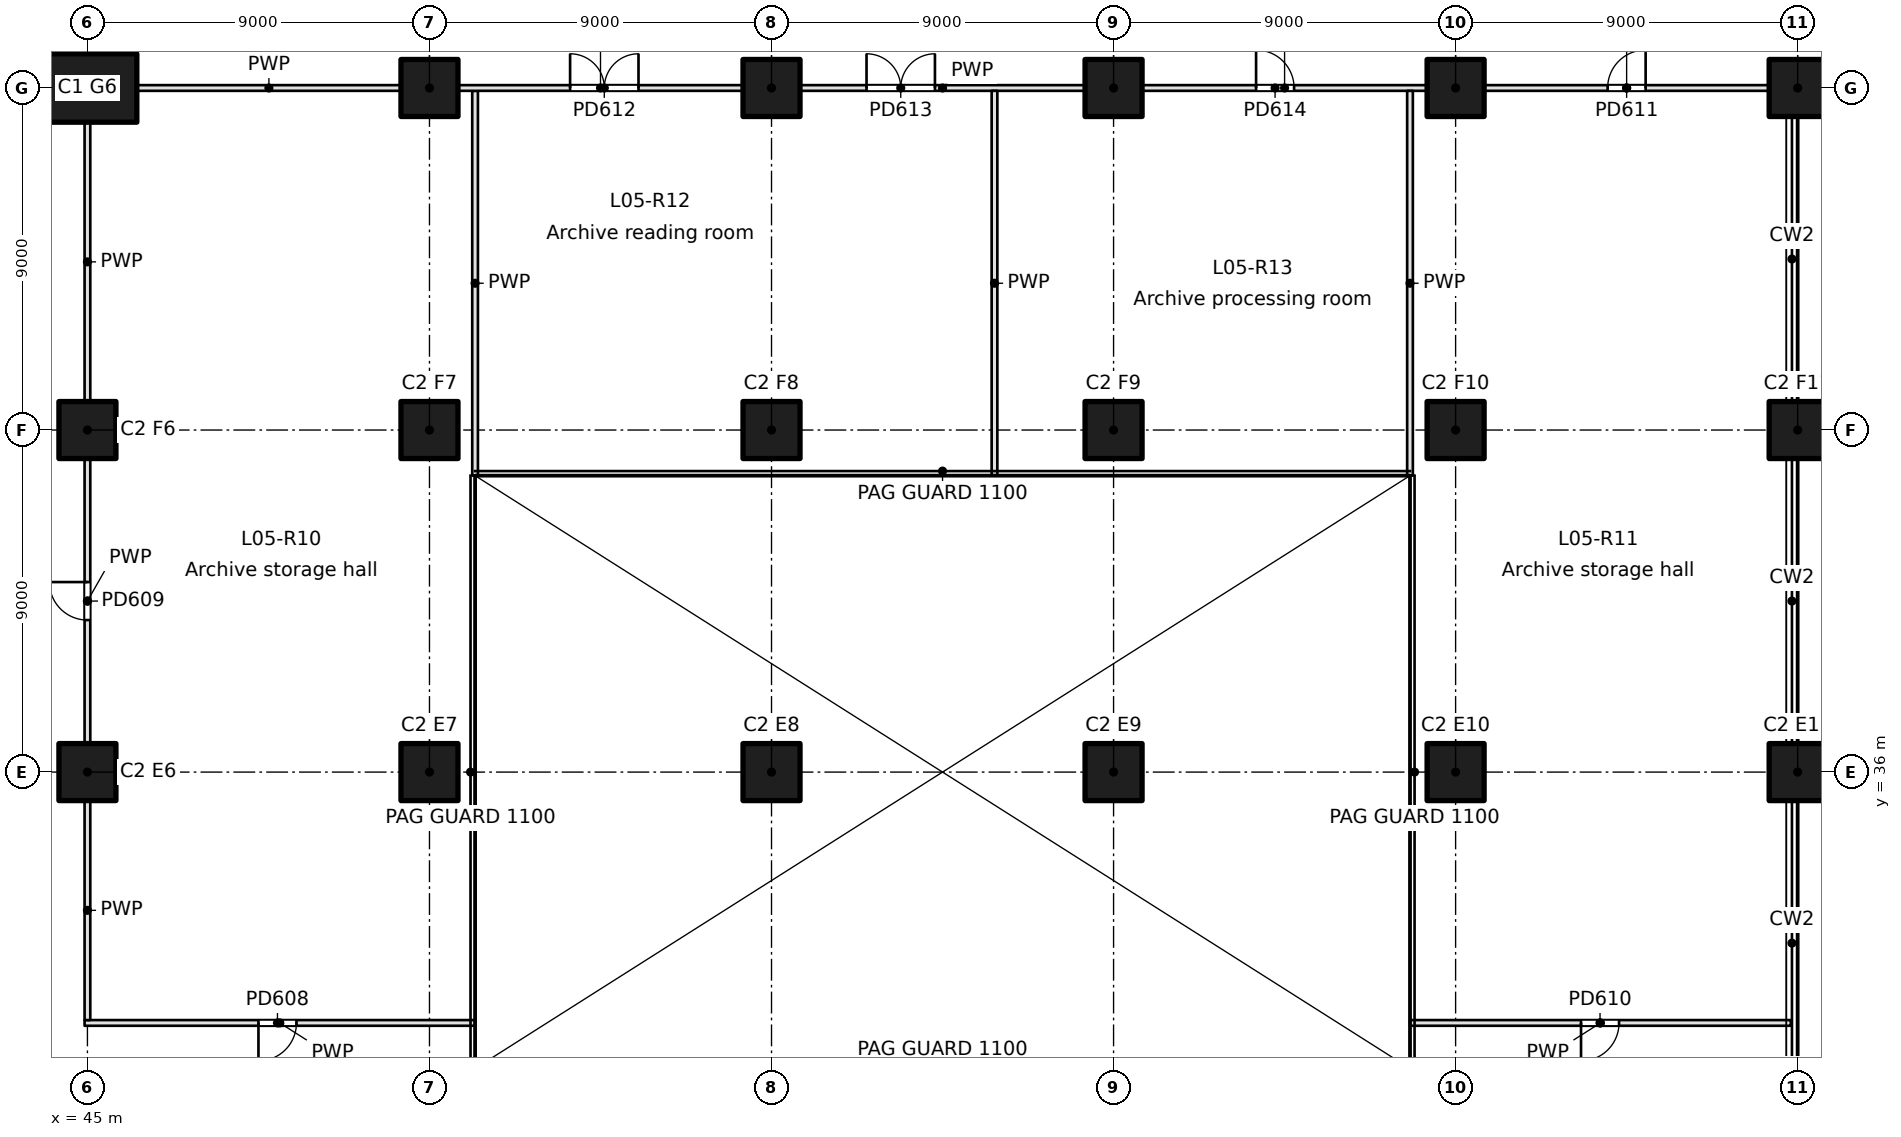
"""IFC4 building model, lengths in metres.
Left out: names, types, materials, properties, quantities, classifications, styles, units other than length and angle.
Written with IfcOpenShell. Run it as: python <this file> out.ifc"""

import sys

from ifc_helpers import new_model, si_unit, direction, frame, frame_2d, origin, origin_2d, place, context, subcontext, project, spatial, rectangle, extrude, element, fill, save


model = new_model("IFC4")
c1 = context("Model", 3, precision=1e-05, world=origin(), true_north=direction((0.0, 1.0)))
c2 = subcontext(c1, "Body", "Model", "MODEL_VIEW")
j1 = project(units=[si_unit("LENGTHUNIT", "METRE"), si_unit("PLANEANGLEUNIT", "RADIAN")], contexts=[c1])
p1 = place(None, origin())
s1 = spatial("IfcSite", under=j1, at=p1, CompositionType="ELEMENT")
p2 = place(p1, origin())
s2 = spatial("IfcBuilding", under=s1, at=p2, CompositionType="ELEMENT")
p3 = place(p2, frame((0.0, 0.0, 26.4)))
s3 = spatial("IfcBuildingStorey", under=s2, at=p3, CompositionType="ELEMENT", Elevation=26.4)
for number, where, z_axis, x_axis in (
    (1, (45.0, 36.0, 0.0), (0.0, 0.0, 1.0), (1.0, 0.0, 0.0)),
    (2, (45.0, 45.0, 0.0), (0.0, 0.0, 1.0), (1.0, 0.0, 0.0)),
):
    element("IfcColumn", number, at=place(p3, frame(where, z_axis=z_axis, x_axis=x_axis)), inside=s3, PredefinedType="COLUMN", context=c2, shape_type="SweptSolid", body=[
        extrude(rectangle(XDim=1.5, YDim=1.5, at=origin_2d()), origin(), (0.0, 0.0, 1.0), 4.8),
    ])
p4 = place(p3, frame((45.0, 54.0, 0.0), z_axis=(0.0, 0.0, 1.0), x_axis=(1.0, 0.0, 0.0)))
e3 = element("IfcColumn", 3, at=p4, inside=s3, PredefinedType="COLUMN", context=c2, shape_type="SweptSolid", body=[
    extrude(rectangle(XDim=2.6, YDim=1.8, at=origin_2d()), origin(), (0.0, 0.0, 1.0), 4.8),
])
for number, where, z_axis, x_axis in (
    (4, (54.0, 54.0, 0.0), (0.0, 0.0, 1.0), (1.0, 0.0, 0.0)),
    (5, (63.0, 54.0, 0.0), (0.0, 0.0, 1.0), (1.0, 0.0, 0.0)),
    (6, (72.0, 54.0, 0.0), (0.0, 0.0, 1.0), (1.0, 0.0, 0.0)),
    (7, (81.0, 54.0, 0.0), (0.0, 0.0, 1.0), (1.0, 0.0, 0.0)),
    (8, (90.0, 54.0, 0.0), (0.0, 0.0, 1.0), (1.0, 0.0, 0.0)),
    (9, (90.0, 36.0, 0.0), (0.0, 0.0, 1.0), (1.0, 0.0, 0.0)),
    (10, (90.0, 45.0, 0.0), (0.0, 0.0, 1.0), (1.0, 0.0, 0.0)),
    (11, (54.0, 36.0, 0.0), (0.0, 0.0, 1.0), (1.0, 0.0, 0.0)),
    (12, (54.0, 45.0, 0.0), (0.0, 0.0, 1.0), (1.0, 0.0, 0.0)),
    (13, (63.0, 36.0, 0.0), (0.0, 0.0, 1.0), (1.0, 0.0, 0.0)),
    (14, (63.0, 45.0, 0.0), (0.0, 0.0, 1.0), (1.0, 0.0, 0.0)),
    (15, (72.0, 36.0, 0.0), (0.0, 0.0, 1.0), (1.0, 0.0, 0.0)),
    (16, (72.0, 45.0, 0.0), (0.0, 0.0, 1.0), (1.0, 0.0, 0.0)),
    (17, (81.0, 36.0, 0.0), (0.0, 0.0, 1.0), (1.0, 0.0, 0.0)),
    (18, (81.0, 45.0, 0.0), (0.0, 0.0, 1.0), (1.0, 0.0, 0.0)),
):
    element("IfcColumn", number, at=place(p3, frame(where, z_axis=z_axis, x_axis=x_axis)), inside=s3, PredefinedType="COLUMN", context=c2, shape_type="SweptSolid", body=[
        extrude(rectangle(XDim=1.5, YDim=1.5, at=origin_2d()), origin(), (0.0, 0.0, 1.0), 4.8),
    ])
p5 = place(p3, frame((55.2, 43.8, 0.0), z_axis=(0.0, 0.0, 1.0), x_axis=(0.0, 1.0, 0.0)))
e19 = element("IfcWall", 19, at=p5, inside=s3, PredefinedType="PARTITIONING", context=c2, shape_type="SweptSolid", body=[
    extrude(rectangle(XDim=10.125, YDim=0.15, at=frame_2d((5.062, 0.0))), origin(), (0.0, 0.0, 1.0), 4.35),
])
p6 = place(p3, frame((55.2, 29.4, 0.0), z_axis=(0.0, 0.0, 1.0), x_axis=(-1.0, 0.0, 0.0)))
e20 = element("IfcWall", 20, at=p6, inside=s3, PredefinedType="PARTITIONING", context=c2, shape_type="SweptSolid", body=[
    extrude(rectangle(XDim=10.275, YDim=0.15, at=frame_2d((5.137, 0.0))), origin(), (0.0, 0.0, 1.0), 4.35),
])
p7 = place(p6, frame((4.7, 0.0, 0.0)))
e21 = element("IfcOpeningElement", 21, at=p7, cuts=e20, PredefinedType="OPENING", context=c2, shape_type="SweptSolid", body=[
    extrude(rectangle(XDim=1.0, YDim=2.1, at=frame_2d((0.5, 1.05))), frame((0.0, 0.075, 0.0), z_axis=(0.0, -1.0, 0.0), x_axis=(1.0, 0.0, 0.0)), (0.0, 0.0, 1.0), 0.15),
])
p8 = place(p3, frame((89.82, 29.4, 0.0), z_axis=(0.0, 0.0, 1.0), x_axis=(-1.0, 0.0, 0.0)))
e22 = element("IfcWall", 22, at=p8, inside=s3, PredefinedType="PARTITIONING", context=c2, shape_type="SweptSolid", body=[
    extrude(rectangle(XDim=10.02, YDim=0.15, at=frame_2d((5.01, 0.0))), origin(), (0.0, 0.0, 1.0), 4.35),
])
p9 = place(p8, frame((4.52, 0.0, 0.0)))
e23 = element("IfcOpeningElement", 23, at=p9, cuts=e22, PredefinedType="OPENING", context=c2, shape_type="SweptSolid", body=[
    extrude(rectangle(XDim=1.0, YDim=2.1, at=frame_2d((0.5, 1.05))), frame((0.0, 0.075, 0.0), z_axis=(0.0, -1.0, 0.0), x_axis=(1.0, 0.0, 0.0)), (0.0, 0.0, 1.0), 0.15),
])
p10 = place(p3, frame((45.0, 29.475, 0.0), z_axis=(0.0, 0.0, 1.0), x_axis=(0.0, 1.0, 0.0)))
e24 = element("IfcWall", 24, at=p10, inside=s3, PredefinedType="PARTITIONING", context=c2, shape_type="SweptSolid", body=[
    extrude(rectangle(XDim=5.775, YDim=0.15, at=frame_2d((2.887, 0.0))), origin(), (0.0, 0.0, 1.0), 4.35),
])
p11 = place(p3, frame((45.0, 36.75, 0.0), z_axis=(0.0, 0.0, 1.0), x_axis=(0.0, 1.0, 0.0)))
e25 = element("IfcWall", 25, at=p11, inside=s3, PredefinedType="PARTITIONING", context=c2, shape_type="SweptSolid", body=[
    extrude(rectangle(XDim=7.5, YDim=0.15, at=frame_2d((3.75, 0.0))), origin(), (0.0, 0.0, 1.0), 4.35),
])
p12 = place(p11, frame((3.25, 0.0, 0.0)))
e26 = element("IfcOpeningElement", 26, at=p12, cuts=e25, PredefinedType="OPENING", context=c2, shape_type="SweptSolid", body=[
    extrude(rectangle(XDim=1.0, YDim=2.1, at=frame_2d((0.5, 1.05))), frame((0.0, 0.075, 0.0), z_axis=(0.0, -1.0, 0.0), x_axis=(1.0, 0.0, 0.0)), (0.0, 0.0, 1.0), 0.15),
])
p13 = place(p3, frame((45.0, 45.75, 0.0), z_axis=(0.0, 0.0, 1.0), x_axis=(0.0, 1.0, 0.0)))
e27 = element("IfcWall", 27, at=p13, inside=s3, PredefinedType="PARTITIONING", context=c2, shape_type="SweptSolid", body=[
    extrude(rectangle(XDim=7.35, YDim=0.15, at=frame_2d((3.675, 0.0))), origin(), (0.0, 0.0, 1.0), 4.35),
])
p14 = place(p3, frame((46.3, 54.0, 0.0), z_axis=(0.0, 0.0, 1.0), x_axis=(1.0, 0.0, 0.0)))
e28 = element("IfcWall", 28, at=p14, inside=s3, PredefinedType="PARTITIONING", context=c2, shape_type="SweptSolid", body=[
    extrude(rectangle(XDim=6.95, YDim=0.15, at=frame_2d((3.475, 0.0))), origin(), (0.0, 0.0, 1.0), 4.35),
])
p15 = place(p3, frame((54.75, 54.0, 0.0), z_axis=(0.0, 0.0, 1.0), x_axis=(1.0, 0.0, 0.0)))
e29 = element("IfcWall", 29, at=p15, inside=s3, PredefinedType="PARTITIONING", context=c2, shape_type="SweptSolid", body=[
    extrude(rectangle(XDim=7.5, YDim=0.15, at=frame_2d((3.75, 0.0))), origin(), (0.0, 0.0, 1.0), 4.35),
])
p16 = place(p15, frame((2.95, 0.0, 0.0)))
e30 = element("IfcOpeningElement", 30, at=p16, cuts=e29, PredefinedType="OPENING", context=c2, shape_type="SweptSolid", body=[
    extrude(rectangle(XDim=1.8, YDim=2.1, at=frame_2d((0.9, 1.05))), frame((0.0, 0.075, 0.0), z_axis=(0.0, -1.0, 0.0), x_axis=(1.0, 0.0, 0.0)), (0.0, 0.0, 1.0), 0.15),
])
p17 = place(p3, frame((63.75, 54.0, 0.0), z_axis=(0.0, 0.0, 1.0), x_axis=(1.0, 0.0, 0.0)))
e31 = element("IfcWall", 31, at=p17, inside=s3, PredefinedType="PARTITIONING", context=c2, shape_type="SweptSolid", body=[
    extrude(rectangle(XDim=7.5, YDim=0.15, at=frame_2d((3.75, 0.0))), origin(), (0.0, 0.0, 1.0), 4.35),
])
p18 = place(p17, frame((1.75, 0.0, 0.0)))
e32 = element("IfcOpeningElement", 32, at=p18, cuts=e31, PredefinedType="OPENING", context=c2, shape_type="SweptSolid", body=[
    extrude(rectangle(XDim=1.8, YDim=2.1, at=frame_2d((0.9, 1.05))), frame((0.0, 0.075, 0.0), z_axis=(0.0, -1.0, 0.0), x_axis=(1.0, 0.0, 0.0)), (0.0, 0.0, 1.0), 0.15),
])
p19 = place(p3, frame((72.75, 54.0, 0.0), z_axis=(0.0, 0.0, 1.0), x_axis=(1.0, 0.0, 0.0)))
e33 = element("IfcWall", 33, at=p19, inside=s3, PredefinedType="PARTITIONING", context=c2, shape_type="SweptSolid", body=[
    extrude(rectangle(XDim=7.5, YDim=0.15, at=frame_2d((3.75, 0.0))), origin(), (0.0, 0.0, 1.0), 4.35),
])
p20 = place(p19, frame((3.0, 0.0, 0.0)))
e34 = element("IfcOpeningElement", 34, at=p20, cuts=e33, PredefinedType="OPENING", context=c2, shape_type="SweptSolid", body=[
    extrude(rectangle(XDim=1.0, YDim=2.1, at=frame_2d((0.5, 1.05))), frame((0.0, 0.075, 0.0), z_axis=(0.0, -1.0, 0.0), x_axis=(1.0, 0.0, 0.0)), (0.0, 0.0, 1.0), 0.15),
])
p21 = place(p3, frame((81.75, 54.0, 0.0), z_axis=(0.0, 0.0, 1.0), x_axis=(1.0, 0.0, 0.0)))
e35 = element("IfcWall", 35, at=p21, inside=s3, PredefinedType="PARTITIONING", context=c2, shape_type="SweptSolid", body=[
    extrude(rectangle(XDim=7.5, YDim=0.15, at=frame_2d((3.75, 0.0))), origin(), (0.0, 0.0, 1.0), 4.35),
])
p22 = place(p21, frame((3.25, 0.0, 0.0)))
e36 = element("IfcOpeningElement", 36, at=p22, cuts=e35, PredefinedType="OPENING", context=c2, shape_type="SweptSolid", body=[
    extrude(rectangle(XDim=1.0, YDim=2.1, at=frame_2d((0.5, 1.05))), frame((0.0, 0.075, 0.0), z_axis=(0.0, -1.0, 0.0), x_axis=(1.0, 0.0, 0.0)), (0.0, 0.0, 1.0), 0.15),
])
for number, where, z_axis, x_axis in (
    (37, (79.8, 43.8, 0.0), (0.0, 0.0, 1.0), (0.0, 1.0, 0.0)),
    (38, (68.867, 43.8, 0.0), (0.0, 0.0, 1.0), (0.0, 1.0, 0.0)),
):
    element("IfcWall", number, at=place(p3, frame(where, z_axis=z_axis, x_axis=x_axis)), inside=s3, PredefinedType="PARTITIONING", context=c2, shape_type="SweptSolid", body=[
        extrude(rectangle(XDim=10.125, YDim=0.15, at=frame_2d((5.062, 0.0))), origin(), (0.0, 0.0, 1.0), 4.35),
    ])
p23 = place(p7, origin())
e39 = element("IfcDoor", 39, at=p23, inside=s3, OperationType="SINGLE_SWING_RIGHT", PredefinedType="DOOR", context=c2, shape_type="SweptSolid", body=[
    extrude(rectangle(XDim=1.0, YDim=2.1, at=frame_2d((0.5, 1.05))), frame((0.0, 0.025, 0.0), z_axis=(0.0, -1.0, 0.0), x_axis=(1.0, 0.0, 0.0)), (0.0, 0.0, 1.0), 0.05),
])
fill(e21, e39)
p24 = place(p12, origin())
e40 = element("IfcDoor", 40, at=p24, inside=s3, OperationType="SINGLE_SWING_RIGHT", PredefinedType="DOOR", context=c2, shape_type="SweptSolid", body=[
    extrude(rectangle(XDim=1.0, YDim=2.1, at=frame_2d((0.5, 1.05))), frame((0.0, 0.025, 0.0), z_axis=(0.0, -1.0, 0.0), x_axis=(1.0, 0.0, 0.0)), (0.0, 0.0, 1.0), 0.05),
])
fill(e26, e40)
p25 = place(p9, origin())
e41 = element("IfcDoor", 41, at=p25, inside=s3, OperationType="SINGLE_SWING_RIGHT", PredefinedType="DOOR", context=c2, shape_type="SweptSolid", body=[
    extrude(rectangle(XDim=1.0, YDim=2.1, at=frame_2d((0.5, 1.05))), frame((0.0, 0.025, 0.0), z_axis=(0.0, -1.0, 0.0), x_axis=(1.0, 0.0, 0.0)), (0.0, 0.0, 1.0), 0.05),
])
fill(e23, e41)
p26 = place(p22, origin())
e42 = element("IfcDoor", 42, at=p26, inside=s3, OperationType="SINGLE_SWING_RIGHT", PredefinedType="DOOR", context=c2, shape_type="SweptSolid", body=[
    extrude(rectangle(XDim=1.0, YDim=2.1, at=frame_2d((0.5, 1.05))), frame((0.0, 0.025, 0.0), z_axis=(0.0, -1.0, 0.0), x_axis=(1.0, 0.0, 0.0)), (0.0, 0.0, 1.0), 0.05),
])
fill(e36, e42)
p27 = place(p16, origin())
e43 = element("IfcDoor", 43, at=p27, inside=s3, OperationType="DOUBLE_DOOR_SINGLE_SWING", PredefinedType="DOOR", context=c2, shape_type="SweptSolid", body=[
    extrude(rectangle(XDim=1.8, YDim=2.1, at=frame_2d((0.9, 1.05))), frame((0.0, 0.025, 0.0), z_axis=(0.0, -1.0, 0.0), x_axis=(1.0, 0.0, 0.0)), (0.0, 0.0, 1.0), 0.05),
])
fill(e30, e43)
p28 = place(p18, origin())
e44 = element("IfcDoor", 44, at=p28, inside=s3, OperationType="DOUBLE_DOOR_SINGLE_SWING", PredefinedType="DOOR", context=c2, shape_type="SweptSolid", body=[
    extrude(rectangle(XDim=1.8, YDim=2.1, at=frame_2d((0.9, 1.05))), frame((0.0, 0.025, 0.0), z_axis=(0.0, -1.0, 0.0), x_axis=(1.0, 0.0, 0.0)), (0.0, 0.0, 1.0), 0.05),
])
fill(e32, e44)
p29 = place(p20, origin())
e45 = element("IfcDoor", 45, at=p29, inside=s3, OperationType="SINGLE_SWING_LEFT", PredefinedType="DOOR", context=c2, shape_type="SweptSolid", body=[
    extrude(rectangle(XDim=1.0, YDim=2.1, at=frame_2d((0.5, 1.05))), frame((0.0, 0.025, 0.0), z_axis=(0.0, -1.0, 0.0), x_axis=(1.0, 0.0, 0.0)), (0.0, 0.0, 1.0), 0.05),
])
fill(e34, e45)
save(model, sys.argv[1])
